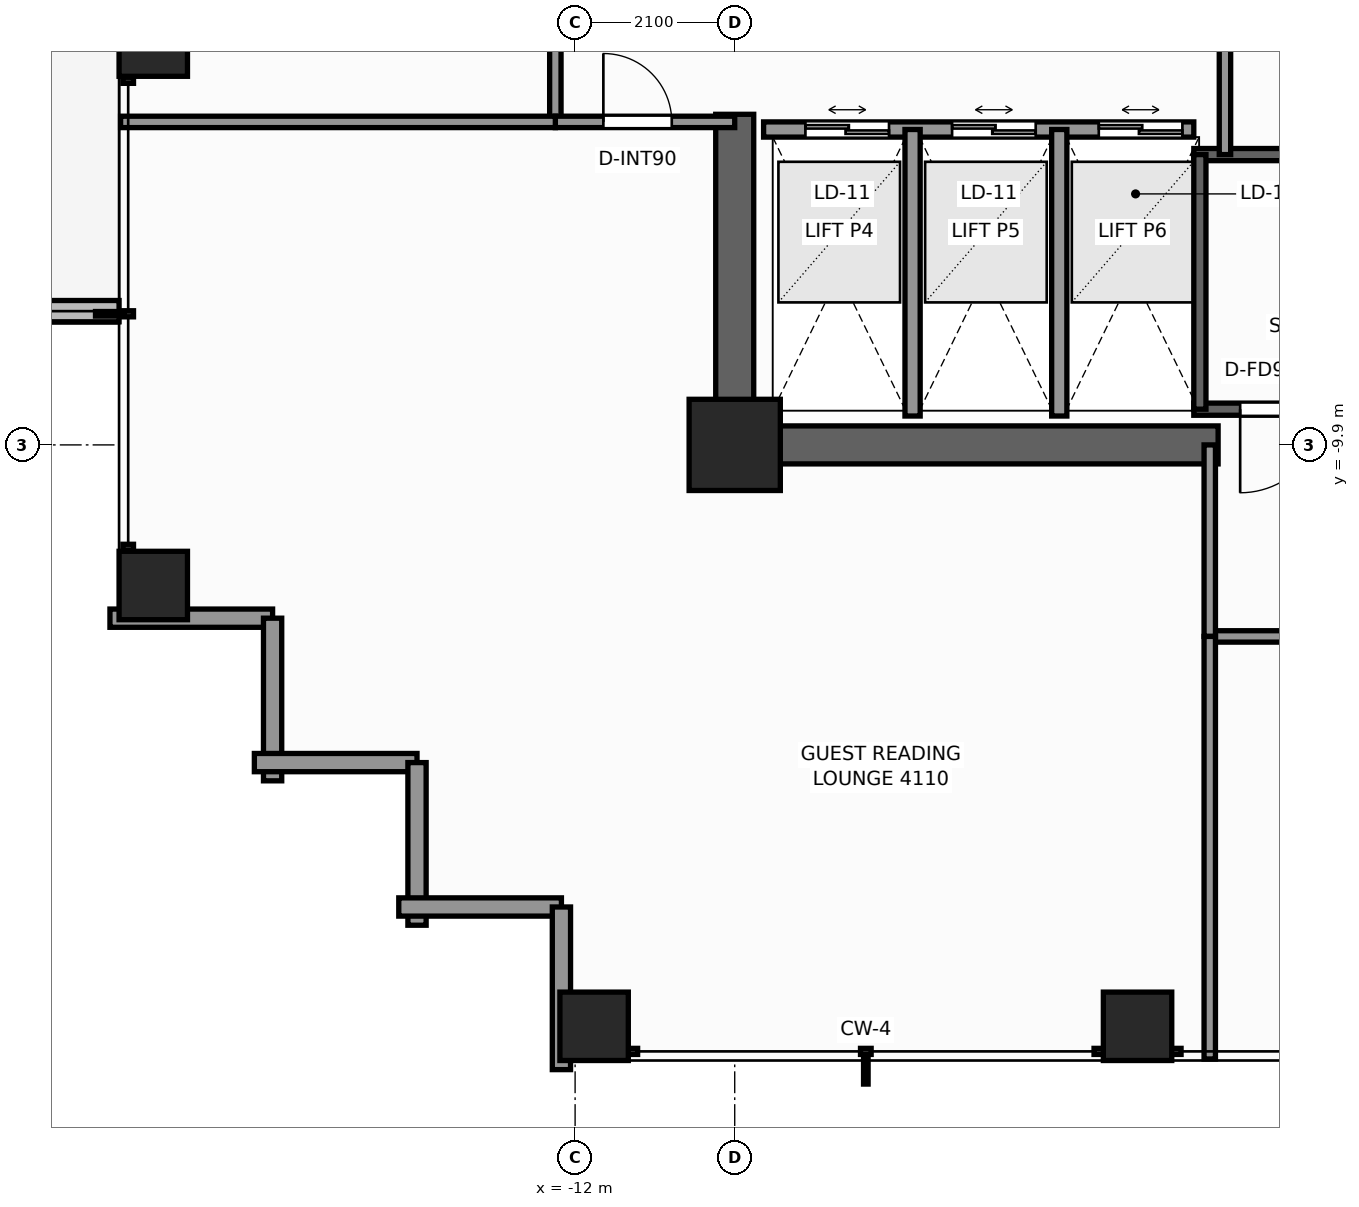
"""IFC4 building model, lengths in metres.
Left out: names, types, materials, properties, quantities, classifications, styles, units other than length and angle.
Written with IfcOpenShell. Run it as: python <this file> out.ifc"""

import sys

from ifc_helpers import new_model, si_unit, direction, frame, frame_2d, origin, origin_2d, place, context, subcontext, project, spatial, rectangle, extrude, element, fill, save


model = new_model("IFC4")
c1 = context("Model", 3, precision=1e-05, world=origin(), true_north=direction((0.0, 1.0)))
c2 = subcontext(c1, "Body", "Model", "MODEL_VIEW")
j1 = project(units=[si_unit("LENGTHUNIT", "METRE"), si_unit("PLANEANGLEUNIT", "RADIAN")], contexts=[c1])
p1 = place(None, origin())
s1 = spatial("IfcSite", under=j1, at=p1, CompositionType="ELEMENT")
p2 = place(p1, origin())
s2 = spatial("IfcBuilding", under=s1, at=p2, CompositionType="ELEMENT")
p3 = place(p2, frame((0.0, 0.0, 141.5)))
s3 = spatial("IfcBuildingStorey", under=s2, at=p3, CompositionType="ELEMENT", Elevation=141.5)
p4 = place(p3, frame((-3.54, -9.9, 0.0), z_axis=(0.0, 0.0, 1.0), x_axis=(-1.0, 0.0, 0.0)))
e1 = element("IfcWall", 1, at=p4, inside=s3, PredefinedType="SHEAR", context=c2, shape_type="SweptSolid", body=[
    extrude(rectangle(XDim=6.61, YDim=0.5, at=frame_2d((3.305, 0.0))), origin(), (0.0, 0.0, 1.0), 3.3),
])
p5 = place(p3, frame((-9.9, -9.65, 0.0), z_axis=(0.0, 0.0, 1.0), x_axis=(0.0, 1.0, 0.0)))
e2 = element("IfcWall", 2, at=p5, inside=s3, PredefinedType="SHEAR", context=c2, shape_type="SweptSolid", body=[
    extrude(rectangle(XDim=4.1, YDim=0.5, at=frame_2d((2.05, 0.0))), origin(), (0.0, 0.0, 1.0), 3.3),
])
p6 = place(p3, frame((-9.9, -9.9, 0.0), z_axis=(0.0, 0.0, 1.0), x_axis=(1.0, 0.0, 0.0)))
e3 = element("IfcColumn", 3, at=p6, inside=s3, PredefinedType="COLUMN", context=c2, shape_type="SweptSolid", body=[
    extrude(rectangle(XDim=1.2, YDim=1.2, at=origin_2d()), origin(), (0.0, 0.0, 1.0), 3.3),
])
for number, where, z_axis, x_axis in (
    (4, (-11.75, -17.55, 0.0), (0.0, 0.0, 1.0), (1.0, 0.0, 0.0)),
    (5, (-4.6, -17.55, 0.0), (0.0, 0.0, 1.0), (1.0, 0.0, 0.0)),
    (6, (-17.55, -11.75, 0.0), (0.0, 0.0, 1.0), (1.0, 0.0, 0.0)),
    (7, (-17.55, -4.6, 0.0), (0.0, 0.0, 1.0), (1.0, 0.0, 0.0)),
):
    element("IfcColumn", number, at=place(p3, frame(where, z_axis=z_axis, x_axis=x_axis)), inside=s3, PredefinedType="COLUMN", context=c2, shape_type="SweptSolid", body=[
        extrude(rectangle(XDim=0.9, YDim=0.9, at=origin_2d()), origin(), (0.0, 0.0, 1.0), 3.3),
    ])
p7 = place(p3, frame((-21.3, -8.14, -0.02), z_axis=(0.0, 0.0, 1.0), x_axis=(1.0, 0.0, 0.0)))
e8 = element("IfcWall", 8, at=p7, inside=s3, PredefinedType="PARAPET", context=c2, shape_type="SweptSolid", body=[
    extrude(rectangle(XDim=3.3, YDim=0.28, at=frame_2d((1.65, 0.0))), origin(), (0.0, 0.0, 1.0), 0.42),
])
for number, where, z_axis, x_axis in (
    (9, (-15.98, -12.18, 0.0), (0.0, 0.0, 1.0), (-1.0, 0.0, 0.0)),
    (10, (-15.98, -14.32, 0.0), (0.0, 0.0, 1.0), (0.0, 1.0, 0.0)),
):
    element("IfcWall", number, at=place(p3, frame(where, z_axis=z_axis, x_axis=x_axis)), inside=s3, PredefinedType="STANDARD", context=c2, shape_type="SweptSolid", body=[
        extrude(rectangle(XDim=2.14, YDim=0.24, at=frame_2d((1.07, 0.0))), origin(), (0.0, 0.0, 1.0), 2.479),
    ])
for number, where, z_axis, x_axis in (
    (11, (-14.08, -14.08, 0.0), (0.0, 0.0, 1.0), (-1.0, 0.0, 0.0)),
    (12, (-14.08, -16.22, 0.0), (0.0, 0.0, 1.0), (0.0, 1.0, 0.0)),
):
    element("IfcWall", number, at=place(p3, frame(where, z_axis=z_axis, x_axis=x_axis)), inside=s3, PredefinedType="STANDARD", context=c2, shape_type="SweptSolid", body=[
        extrude(rectangle(XDim=2.14, YDim=0.24, at=frame_2d((1.07, 0.0))), origin(), (0.0, 0.0, 1.0), 2.479),
    ])
for number, where, z_axis, x_axis in (
    (13, (-12.18, -15.98, 0.0), (0.0, 0.0, 1.0), (-1.0, 0.0, 0.0)),
    (14, (-12.18, -18.12, 0.0), (0.0, 0.0, 1.0), (0.0, 1.0, 0.0)),
):
    element("IfcWall", number, at=place(p3, frame(where, z_axis=z_axis, x_axis=x_axis)), inside=s3, PredefinedType="STANDARD", context=c2, shape_type="SweptSolid", body=[
        extrude(rectangle(XDim=2.14, YDim=0.24, at=frame_2d((1.07, 0.0))), origin(), (0.0, 0.0, 1.0), 2.479),
    ])
p8 = place(p3, frame((3.86, -9.43, 0.0), z_axis=(0.0, 0.0, 1.0), x_axis=(-1.0, 0.0, 0.0)))
e15 = element("IfcWall", 15, at=p8, inside=s3, PredefinedType="SHEAR", context=c2, shape_type="SweptSolid", body=[
    extrude(rectangle(XDim=7.72, YDim=0.16, at=frame_2d((3.86, 0.0))), origin(), (0.0, 0.0, 1.0), 3.3),
])
p9 = place(p8, frame((6.01, 0.0, 0.0)))
e16 = element("IfcOpeningElement", 16, at=p9, cuts=e15, PredefinedType="OPENING", context=c2, shape_type="SweptSolid", body=[
    extrude(rectangle(XDim=1.1, YDim=2.2, at=frame_2d((0.55, 1.1))), frame((0.0, 0.09, 0.0), z_axis=(0.0, -1.0, 0.0), x_axis=(1.0, 0.0, 0.0)), (0.0, 0.0, 1.0), 0.18),
])
p10 = place(p3, frame((-3.86, -6.08, 0.0), z_axis=(0.0, 0.0, 1.0), x_axis=(1.0, 0.0, 0.0)))
e17 = element("IfcWall", 17, at=p10, inside=s3, PredefinedType="SHEAR", context=c2, shape_type="SweptSolid", body=[
    extrude(rectangle(XDim=7.72, YDim=0.16, at=frame_2d((3.86, 0.0))), origin(), (0.0, 0.0, 1.0), 3.3),
])
p11 = place(p3, frame((-3.78, -9.43, 0.0), z_axis=(0.0, 0.0, 1.0), x_axis=(0.0, 1.0, 0.0)))
e18 = element("IfcWall", 18, at=p11, inside=s3, PredefinedType="SHEAR", context=c2, shape_type="SweptSolid", body=[
    extrude(rectangle(XDim=3.35, YDim=0.16, at=frame_2d((1.675, 0.0))), origin(), (0.0, 0.0, 1.0), 3.3),
])
p12 = place(p3, frame((-9.52, -5.75, 0.0), z_axis=(0.0, 0.0, 1.0), x_axis=(1.0, 0.0, 0.0)))
e19 = element("IfcWall", 19, at=p12, inside=s3, PredefinedType="SOLIDWALL", context=c2, shape_type="SweptSolid", body=[
    extrude(rectangle(XDim=5.66, YDim=0.2, at=frame_2d((2.83, 0.0))), origin(), (0.0, 0.0, 1.0), 3.1),
])
p13 = place(p12, frame((0.55, 0.0, 0.0)))
e20 = element("IfcOpeningElement", 20, at=p13, cuts=e19, PredefinedType="OPENING", context=c2, shape_type="SweptSolid", body=[
    extrude(rectangle(XDim=1.1, YDim=2.2, at=frame_2d((0.55, 1.1))), frame((0.0, 0.11, 0.0), z_axis=(0.0, -1.0, 0.0), x_axis=(1.0, 0.0, 0.0)), (0.0, 0.0, 1.0), 0.22),
])
p14 = place(p12, frame((2.48, 0.0, 0.0)))
e21 = element("IfcOpeningElement", 21, at=p14, cuts=e19, PredefinedType="OPENING", context=c2, shape_type="SweptSolid", body=[
    extrude(rectangle(XDim=1.1, YDim=2.2, at=frame_2d((0.55, 1.1))), frame((0.0, 0.11, 0.0), z_axis=(0.0, -1.0, 0.0), x_axis=(1.0, 0.0, 0.0)), (0.0, 0.0, 1.0), 0.22),
])
p15 = place(p12, frame((4.41, 0.0, 0.0)))
e22 = element("IfcOpeningElement", 22, at=p15, cuts=e19, PredefinedType="OPENING", context=c2, shape_type="SweptSolid", body=[
    extrude(rectangle(XDim=1.1, YDim=2.2, at=frame_2d((0.55, 1.1))), frame((0.0, 0.11, 0.0), z_axis=(0.0, -1.0, 0.0), x_axis=(1.0, 0.0, 0.0)), (0.0, 0.0, 1.0), 0.22),
])
for number, where, z_axis, x_axis in (
    (23, (-7.56, -9.52, 0.0), (0.0, 0.0, 1.0), (0.0, 1.0, 0.0)),
    (24, (-5.63, -9.52, 0.0), (0.0, 0.0, 1.0), (0.0, 1.0, 0.0)),
):
    element("IfcWall", number, at=place(p3, frame(where, z_axis=z_axis, x_axis=x_axis)), inside=s3, PredefinedType="SOLIDWALL", context=c2, shape_type="SweptSolid", body=[
        extrude(rectangle(XDim=3.77, YDim=0.2, at=frame_2d((1.885, 0.0))), origin(), (0.0, 0.0, 1.0), 3.1),
    ])
p16 = place(p3, frame((-3.45, -6.08, 0.0), z_axis=(0.0, 0.0, 1.0), x_axis=(0.0, 1.0, 0.0)))
e25 = element("IfcWall", 25, at=p16, inside=s3, PredefinedType="PARTITIONING", context=c2, shape_type="SweptSolid", body=[
    extrude(rectangle(XDim=2.36, YDim=0.15, at=frame_2d((1.18, 0.0))), origin(), (0.0, 0.0, 1.0), 3.1),
])
p17 = place(p3, frame((-3.65, -12.42, 0.0), z_axis=(0.0, 0.0, 1.0), x_axis=(1.0, 0.0, 0.0)))
e26 = element("IfcWall", 26, at=p17, inside=s3, PredefinedType="PARTITIONING", context=c2, shape_type="SweptSolid", body=[
    extrude(rectangle(XDim=16.07, YDim=0.15, at=frame_2d((8.035, 0.0))), origin(), (0.0, 0.0, 1.0), 2.312),
])
p18 = place(p17, frame((5.205, 0.0, 0.0)))
e27 = element("IfcOpeningElement", 27, at=p18, cuts=e26, PredefinedType="OPENING", context=c2, shape_type="SweptSolid", body=[
    extrude(rectangle(XDim=0.95, YDim=2.06, at=frame_2d((0.475, 1.03))), frame((0.0, 0.085, 0.0), z_axis=(0.0, -1.0, 0.0), x_axis=(1.0, 0.0, 0.0)), (0.0, 0.0, 1.0), 0.17),
])
p19 = place(p17, frame((11.035, 0.0, 0.0)))
e28 = element("IfcOpeningElement", 28, at=p19, cuts=e26, PredefinedType="OPENING", context=c2, shape_type="SweptSolid", body=[
    extrude(rectangle(XDim=0.95, YDim=2.06, at=frame_2d((0.475, 1.03))), frame((0.0, 0.085, 0.0), z_axis=(0.0, -1.0, 0.0), x_axis=(1.0, 0.0, 0.0)), (0.0, 0.0, 1.0), 0.17),
])
p20 = place(p3, frame((-3.65, -12.42, 0.0), z_axis=(0.0, 0.0, 1.0), x_axis=(0.0, 1.0, 0.0)))
e29 = element("IfcWall", 29, at=p20, inside=s3, PredefinedType="PARTITIONING", context=c2, shape_type="SweptSolid", body=[
    extrude(rectangle(XDim=2.52, YDim=0.15, at=frame_2d((1.26, 0.0))), origin(), (0.0, 0.0, 1.0), 3.1),
])
p21 = place(p3, frame((-12.26, -5.65, 0.0), z_axis=(0.0, 0.0, 1.0), x_axis=(0.0, 1.0, 0.0)))
e30 = element("IfcWall", 30, at=p21, inside=s3, PredefinedType="PARTITIONING", context=c2, shape_type="SweptSolid", body=[
    extrude(rectangle(XDim=3.6, YDim=0.15, at=frame_2d((1.8, 0.0))), origin(), (0.0, 0.0, 1.0), 2.312),
])
p22 = place(p21, frame((2.156, 0.0, 0.0)))
e31 = element("IfcOpeningElement", 31, at=p22, cuts=e30, PredefinedType="OPENING", context=c2, shape_type="SweptSolid", body=[
    extrude(rectangle(XDim=0.9, YDim=2.06, at=frame_2d((0.45, 1.03))), frame((0.0, 0.085, 0.0), z_axis=(0.0, -1.0, 0.0), x_axis=(1.0, 0.0, 0.0)), (0.0, 0.0, 1.0), 0.17),
])
p23 = place(p3, frame((-12.26, -5.65, 0.0), z_axis=(0.0, 0.0, 1.0), x_axis=(1.0, 0.0, 0.0)))
e32 = element("IfcWall", 32, at=p23, inside=s3, PredefinedType="PARTITIONING", context=c2, shape_type="SweptSolid", body=[
    extrude(rectangle(XDim=2.36, YDim=0.15, at=frame_2d((1.18, 0.0))), origin(), (0.0, 0.0, 1.0), 3.1),
])
p24 = place(p23, frame((0.632, 0.0, 0.0)))
e33 = element("IfcOpeningElement", 33, at=p24, cuts=e32, PredefinedType="OPENING", context=c2, shape_type="SweptSolid", body=[
    extrude(rectangle(XDim=0.9, YDim=2.06, at=frame_2d((0.45, 1.03))), frame((0.0, 0.085, 0.0), z_axis=(0.0, -1.0, 0.0), x_axis=(1.0, 0.0, 0.0)), (0.0, 0.0, 1.0), 0.17),
])
p25 = place(p3, frame((-17.98, -5.65, 0.0), z_axis=(0.0, 0.0, 1.0), x_axis=(1.0, 0.0, 0.0)))
e34 = element("IfcWall", 34, at=p25, inside=s3, PredefinedType="PARTITIONING", context=c2, shape_type="SweptSolid", body=[
    extrude(rectangle(XDim=5.72, YDim=0.15, at=frame_2d((2.86, 0.0))), origin(), (0.0, 0.0, 1.0), 2.469),
])
p26 = place(p3, frame((-3.65, -17.98, 0.0), z_axis=(0.0, 0.0, 1.0), x_axis=(0.0, 1.0, 0.0)))
e35 = element("IfcWall", 35, at=p26, inside=s3, PredefinedType="PARTITIONING", context=c2, shape_type="SweptSolid", body=[
    extrude(rectangle(XDim=5.56, YDim=0.15, at=frame_2d((2.78, 0.0))), origin(), (0.0, 0.0, 1.0), 2.469),
])
p27 = place(p9, origin())
e36 = element("IfcDoor", 36, at=p27, inside=s3, OperationType="SINGLE_SWING_RIGHT", PredefinedType="DOOR", context=c2, shape_type="SweptSolid", body=[
    extrude(rectangle(XDim=1.1, YDim=2.2, at=frame_2d((0.55, 1.1))), frame((0.0, 0.025, 0.0), z_axis=(0.0, -1.0, 0.0), x_axis=(1.0, 0.0, 0.0)), (0.0, 0.0, 1.0), 0.05),
])
fill(e16, e36)
p28 = place(p13, origin())
e37 = element("IfcDoor", 37, at=p28, inside=s3, OperationType="DOUBLE_DOOR_SLIDING", PredefinedType="DOOR", context=c2, shape_type="SweptSolid", body=[
    extrude(rectangle(XDim=1.1, YDim=2.2, at=frame_2d((0.55, 1.1))), frame((0.0, 0.025, 0.0), z_axis=(0.0, -1.0, 0.0), x_axis=(1.0, 0.0, 0.0)), (0.0, 0.0, 1.0), 0.05),
])
fill(e20, e37)
p29 = place(p14, origin())
e38 = element("IfcDoor", 38, at=p29, inside=s3, OperationType="DOUBLE_DOOR_SLIDING", PredefinedType="DOOR", context=c2, shape_type="SweptSolid", body=[
    extrude(rectangle(XDim=1.1, YDim=2.2, at=frame_2d((0.55, 1.1))), frame((0.0, 0.025, 0.0), z_axis=(0.0, -1.0, 0.0), x_axis=(1.0, 0.0, 0.0)), (0.0, 0.0, 1.0), 0.05),
])
fill(e21, e38)
p30 = place(p15, origin())
e39 = element("IfcDoor", 39, at=p30, inside=s3, OperationType="DOUBLE_DOOR_SLIDING", PredefinedType="DOOR", context=c2, shape_type="SweptSolid", body=[
    extrude(rectangle(XDim=1.1, YDim=2.2, at=frame_2d((0.55, 1.1))), frame((0.0, 0.025, 0.0), z_axis=(0.0, -1.0, 0.0), x_axis=(1.0, 0.0, 0.0)), (0.0, 0.0, 1.0), 0.05),
])
fill(e22, e39)
p31 = place(p24, origin())
e40 = element("IfcDoor", 40, at=p31, inside=s3, OperationType="SINGLE_SWING_LEFT", PredefinedType="DOOR", context=c2, shape_type="SweptSolid", body=[
    extrude(rectangle(XDim=0.9, YDim=2.06, at=frame_2d((0.45, 1.03))), frame((0.0, 0.025, 0.0), z_axis=(0.0, -1.0, 0.0), x_axis=(1.0, 0.0, 0.0)), (0.0, 0.0, 1.0), 0.05),
])
fill(e33, e40)
save(model, sys.argv[1])
